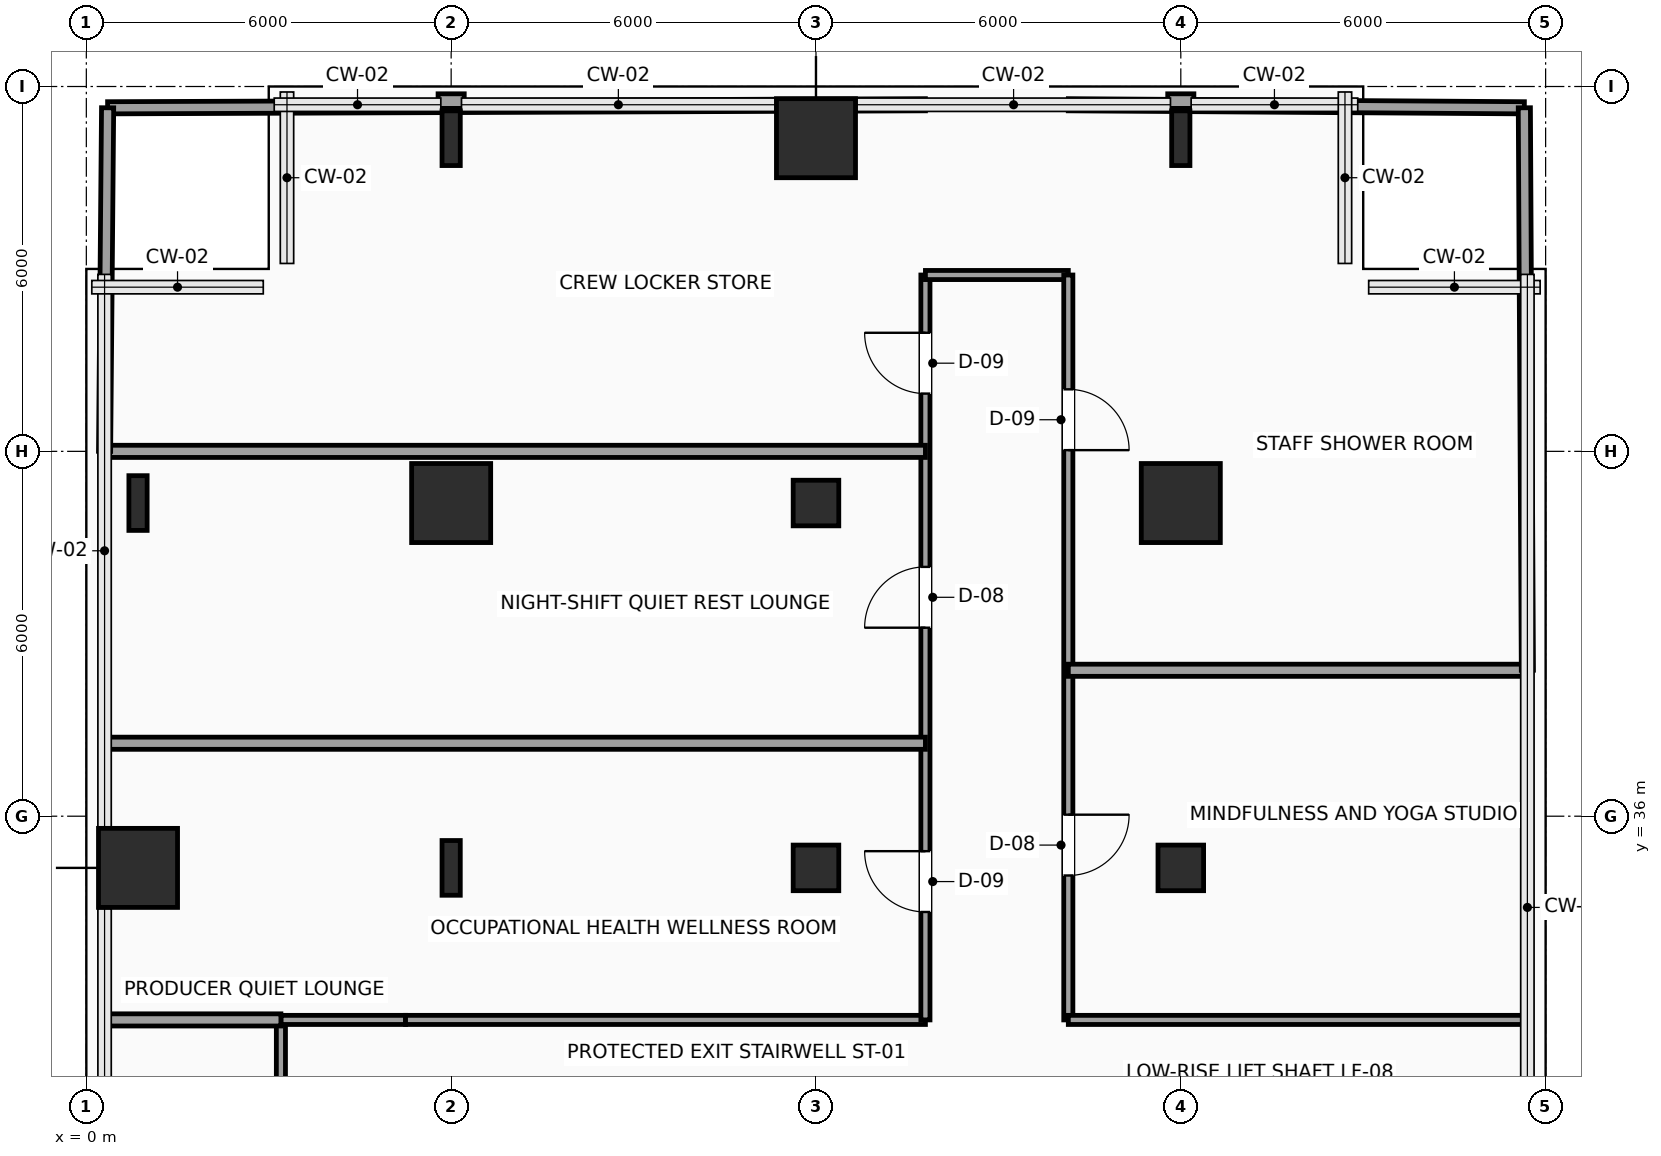
"""IFC4 building model, lengths in metres.
Left out: names, types, materials, properties, quantities, classifications, styles, units other than length and angle.
Written with IfcOpenShell. Run it as: python <this file> out.ifc"""

import sys

from ifc_helpers import new_model, si_unit, direction, frame, frame_2d, origin, origin_2d, place, context, subcontext, project, spatial, rectangle, hollow_rectangle, i_section, extrude, element, fill, save


model = new_model("IFC4")
c1 = context("Model", 3, precision=1e-05, world=origin(), true_north=direction((0.0, 1.0)))
c2 = subcontext(c1, "Body", "Model", "MODEL_VIEW")
j1 = project(units=[si_unit("LENGTHUNIT", "METRE"), si_unit("PLANEANGLEUNIT", "RADIAN")], contexts=[c1])
p1 = place(None, origin())
s1 = spatial("IfcSite", under=j1, at=p1, CompositionType="ELEMENT")
p2 = place(p1, origin())
s2 = spatial("IfcBuilding", under=s1, at=p2, CompositionType="ELEMENT")
p3 = place(p2, frame((0.0, 0.0, 67.5)))
s3 = spatial("IfcBuildingStorey", under=s2, at=p3, CompositionType="ELEMENT", Elevation=67.5)
p4 = place(p3, frame((0.85, 35.15, 0.0), z_axis=(0.0, 0.0, 1.0), x_axis=(1.0, 0.0, 0.0)))
e1 = element("IfcColumn", 1, at=p4, inside=s3, PredefinedType="COLUMN", context=c2, shape_type="SweptSolid", body=[
    extrude(rectangle(XDim=1.3, YDim=1.3, at=origin_2d()), origin(), (0.0, 0.0, 1.0), 3.9),
])
for number, where, z_axis, x_axis in (
    (2, (0.85, 41.15, 0.0), (0.0, 0.0, 1.0), (1.0, 0.0, 0.0)),
    (3, (6.0, 35.15, 0.0), (0.0, 0.0, 1.0), (1.0, 0.0, 0.0)),
):
    element("IfcColumn", number, at=place(p3, frame(where, z_axis=z_axis, x_axis=x_axis)), inside=s3, PredefinedType="COLUMN", context=c2, shape_type="SweptSolid", body=[
        extrude(i_section(OverallWidth=0.3, OverallDepth=0.9, WebThickness=0.019, FlangeThickness=0.035, FilletRadius=0.03, at=origin_2d()), origin(), (0.0, 0.0, 1.0), 3.9),
    ])
p5 = place(p3, frame((6.0, 41.15, 0.0), z_axis=(0.0, 0.0, 1.0), x_axis=(1.0, 0.0, 0.0)))
e4 = element("IfcColumn", 4, at=p5, inside=s3, PredefinedType="COLUMN", context=c2, shape_type="SweptSolid", body=[
    extrude(rectangle(XDim=1.3, YDim=1.3, at=origin_2d()), origin(), (0.0, 0.0, 1.0), 3.9),
])
p6 = place(p3, frame((6.0, 47.15, 0.0), z_axis=(0.0, 0.0, 1.0), x_axis=(1.0, 0.0, 0.0)))
e5 = element("IfcColumn", 5, at=p6, inside=s3, PredefinedType="COLUMN", context=c2, shape_type="SweptSolid", body=[
    extrude(i_section(OverallWidth=0.3, OverallDepth=0.9, WebThickness=0.019, FlangeThickness=0.035, FilletRadius=0.03, at=origin_2d()), origin(), (0.0, 0.0, 1.0), 3.9),
])
for number, where, z_axis, x_axis in (
    (6, (12.0, 35.15, 0.0), (0.0, 0.0, 1.0), (1.0, 0.0, 0.0)),
    (7, (12.0, 41.15, 0.0), (0.0, 0.0, 1.0), (1.0, 0.0, 0.0)),
):
    element("IfcColumn", number, at=place(p3, frame(where, z_axis=z_axis, x_axis=x_axis)), inside=s3, PredefinedType="COLUMN", context=c2, shape_type="SweptSolid", body=[
        extrude(hollow_rectangle(XDim=0.75, YDim=0.75, WallThickness=0.035, InnerFilletRadius=0.035, OuterFilletRadius=0.05, at=origin_2d()), origin(), (0.0, 0.0, 1.0), 3.9),
    ])
p7 = place(p3, frame((12.0, 47.15, 0.0), z_axis=(0.0, 0.0, 1.0), x_axis=(1.0, 0.0, 0.0)))
e8 = element("IfcColumn", 8, at=p7, inside=s3, PredefinedType="COLUMN", context=c2, shape_type="SweptSolid", body=[
    extrude(rectangle(XDim=1.3, YDim=1.3, at=origin_2d()), origin(), (0.0, 0.0, 1.0), 3.9),
])
p8 = place(p3, frame((18.0, 35.15, 0.0), z_axis=(0.0, 0.0, 1.0), x_axis=(1.0, 0.0, 0.0)))
e9 = element("IfcColumn", 9, at=p8, inside=s3, PredefinedType="COLUMN", context=c2, shape_type="SweptSolid", body=[
    extrude(hollow_rectangle(XDim=0.75, YDim=0.75, WallThickness=0.035, InnerFilletRadius=0.035, OuterFilletRadius=0.05, at=origin_2d()), origin(), (0.0, 0.0, 1.0), 3.9),
])
p9 = place(p3, frame((18.0, 41.15, 0.0), z_axis=(0.0, 0.0, 1.0), x_axis=(1.0, 0.0, 0.0)))
e10 = element("IfcColumn", 10, at=p9, inside=s3, PredefinedType="COLUMN", context=c2, shape_type="SweptSolid", body=[
    extrude(rectangle(XDim=1.3, YDim=1.3, at=origin_2d()), origin(), (0.0, 0.0, 1.0), 3.9),
])
p10 = place(p3, frame((18.0, 47.15, 0.0), z_axis=(0.0, 0.0, 1.0), x_axis=(1.0, 0.0, 0.0)))
e11 = element("IfcColumn", 11, at=p10, inside=s3, PredefinedType="COLUMN", context=c2, shape_type="SweptSolid", body=[
    extrude(i_section(OverallWidth=0.3, OverallDepth=0.9, WebThickness=0.019, FlangeThickness=0.035, FilletRadius=0.03, at=origin_2d()), origin(), (0.0, 0.0, 1.0), 3.9),
])
for number, where, z_axis, x_axis in (
    (12, (5.785, 47.76, 0.0), (0.0, 0.0, 1.0), (1.0, 0.0, 0.0)),
    (13, (17.785, 47.76, 0.0), (0.0, 0.0, 1.0), (1.0, 0.0, 0.0)),
):
    element("IfcWall", number, at=place(p3, frame(where, z_axis=z_axis, x_axis=x_axis)), inside=s3, PredefinedType="SOLIDWALL", context=c2, shape_type="SweptSolid", body=[
        extrude(rectangle(XDim=0.43, YDim=0.24, at=frame_2d((0.215, 0.0))), origin(), (0.0, 0.0, 1.0), 3.65),
    ])
p11 = place(p3, frame((3.2, 30.25, 0.0), z_axis=(0.0, 0.0, 1.0), x_axis=(0.0, 1.0, 0.0)))
e14 = element("IfcWall", 14, at=p11, inside=s3, PredefinedType="PARTITIONING", context=c2, shape_type="SweptSolid", body=[
    extrude(rectangle(XDim=2.4, YDim=0.15, at=frame_2d((1.2, 0.0))), origin(), (0.0, 0.0, 1.0), 3.65),
])
p12 = place(p3, frame((3.2, 32.65, 0.0), z_axis=(0.0, 0.0, 1.0), x_axis=(1.0, 0.0, 0.0)))
e15 = element("IfcWall", 15, at=p12, inside=s3, PredefinedType="PARTITIONING", context=c2, shape_type="SweptSolid", body=[
    extrude(rectangle(XDim=2.05, YDim=0.15, at=frame_2d((1.025, 0.0))), origin(), (0.0, 0.0, 1.0), 3.65),
])
p13 = place(p3, frame((5.25, 32.65, 0.0), z_axis=(0.0, 0.0, 1.0), x_axis=(1.0, 0.0, 0.0)))
e16 = element("IfcWall", 16, at=p13, inside=s3, PredefinedType="PARTITIONING", context=c2, shape_type="SweptSolid", body=[
    extrude(rectangle(XDim=8.55, YDim=0.15, at=frame_2d((4.275, 0.0))), origin(), (0.0, 0.0, 1.0), 3.65),
])
p14 = place(p3, frame((13.8, 32.65, 0.0), z_axis=(0.0, 0.0, 1.0), x_axis=(0.0, 1.0, 0.0)))
e17 = element("IfcWall", 17, at=p14, inside=s3, PredefinedType="PARTITIONING", context=c2, shape_type="SweptSolid", body=[
    extrude(rectangle(XDim=12.25, YDim=0.15, at=frame_2d((6.125, 0.0))), origin(), (0.0, 0.0, 1.0), 3.65),
])
p15 = place(p14, frame((1.775, 0.0, 0.0)))
e18 = element("IfcOpeningElement", 18, at=p15, cuts=e17, PredefinedType="OPENING", context=c2, shape_type="SweptSolid", body=[
    extrude(rectangle(XDim=1.0, YDim=2.2, at=frame_2d((0.5, 1.1))), frame((0.0, 0.085, 0.0), z_axis=(0.0, -1.0, 0.0), x_axis=(1.0, 0.0, 0.0)), (0.0, 0.0, 1.0), 0.17),
])
p16 = place(p14, frame((6.45, 0.0, 0.0)))
e19 = element("IfcOpeningElement", 19, at=p16, cuts=e17, PredefinedType="OPENING", context=c2, shape_type="SweptSolid", body=[
    extrude(rectangle(XDim=1.0, YDim=2.2, at=frame_2d((0.5, 1.1))), frame((0.0, 0.085, 0.0), z_axis=(0.0, -1.0, 0.0), x_axis=(1.0, 0.0, 0.0)), (0.0, 0.0, 1.0), 0.17),
])
p17 = place(p14, frame((10.3, 0.0, 0.0)))
e20 = element("IfcOpeningElement", 20, at=p17, cuts=e17, PredefinedType="OPENING", context=c2, shape_type="SweptSolid", body=[
    extrude(rectangle(XDim=1.0, YDim=2.2, at=frame_2d((0.5, 1.1))), frame((0.0, 0.085, 0.0), z_axis=(0.0, -1.0, 0.0), x_axis=(1.0, 0.0, 0.0)), (0.0, 0.0, 1.0), 0.17),
])
p18 = place(p3, frame((13.8, 44.9, 0.0), z_axis=(0.0, 0.0, 1.0), x_axis=(1.0, 0.0, 0.0)))
e21 = element("IfcWall", 21, at=p18, inside=s3, PredefinedType="PARTITIONING", context=c2, shape_type="SweptSolid", body=[
    extrude(rectangle(XDim=2.35, YDim=0.15, at=frame_2d((1.175, 0.0))), origin(), (0.0, 0.0, 1.0), 3.65),
])
p19 = place(p3, frame((16.15, 44.9, 0.0), z_axis=(0.0, 0.0, 1.0), x_axis=(0.0, -1.0, 0.0)))
e22 = element("IfcWall", 22, at=p19, inside=s3, PredefinedType="PARTITIONING", context=c2, shape_type="SweptSolid", body=[
    extrude(rectangle(XDim=12.25, YDim=0.15, at=frame_2d((6.125, 0.0))), origin(), (0.0, 0.0, 1.0), 3.65),
])
p20 = place(p19, frame((8.875, 0.0, 0.0)))
e23 = element("IfcOpeningElement", 23, at=p20, cuts=e22, PredefinedType="OPENING", context=c2, shape_type="SweptSolid", body=[
    extrude(rectangle(XDim=1.0, YDim=2.2, at=frame_2d((0.5, 1.1))), frame((0.0, 0.085, 0.0), z_axis=(0.0, -1.0, 0.0), x_axis=(1.0, 0.0, 0.0)), (0.0, 0.0, 1.0), 0.17),
])
p21 = place(p19, frame((1.88, 0.0, 0.0)))
e24 = element("IfcOpeningElement", 24, at=p21, cuts=e22, PredefinedType="OPENING", context=c2, shape_type="SweptSolid", body=[
    extrude(rectangle(XDim=1.0, YDim=2.2, at=frame_2d((0.5, 1.1))), frame((0.0, 0.085, 0.0), z_axis=(0.0, -1.0, 0.0), x_axis=(1.0, 0.0, 0.0)), (0.0, 0.0, 1.0), 0.17),
])
p22 = place(p3, frame((16.15, 32.65, 0.0), z_axis=(0.0, 0.0, 1.0), x_axis=(1.0, 0.0, 0.0)))
e25 = element("IfcWall", 25, at=p22, inside=s3, PredefinedType="PARTITIONING", context=c2, shape_type="SweptSolid", body=[
    extrude(rectangle(XDim=7.55, YDim=0.15, at=frame_2d((3.775, 0.0))), origin(), (0.0, 0.0, 1.0), 3.65),
])
for number, where, z_axis, x_axis in (
    (26, (0.3, 37.2, 0.0), (0.0, 0.0, 1.0), (1.0, 0.0, 0.0)),
    (27, (0.3, 42.0, 0.0), (0.0, 0.0, 1.0), (1.0, 0.0, 0.0)),
):
    element("IfcWall", number, at=place(p3, frame(where, z_axis=z_axis, x_axis=x_axis)), inside=s3, PredefinedType="PARTITIONING", context=c2, shape_type="SweptSolid", body=[
        extrude(rectangle(XDim=13.5, YDim=0.2, at=frame_2d((6.75, 0.0))), origin(), (0.0, 0.0, 1.0), 3.65),
    ])
p23 = place(p3, frame((0.35, 47.65, 0.0), z_axis=(0.0, 0.0, 1.0), x_axis=(0.99999304924, 0.003728467862, 0.0)))
e28 = element("IfcWall", 28, at=p23, inside=s3, PredefinedType="PARTITIONING", context=c2, shape_type="SweptSolid", body=[
    extrude(rectangle(XDim=5.435, YDim=0.2, at=frame_2d((2.717, 0.0))), origin(), (0.0, 0.0, 1.0), 3.65),
])
p24 = place(p3, frame((6.215, 47.672, 0.0), z_axis=(0.0, 0.0, 1.0), x_axis=(0.999993149305, 0.003701532515, 0.0)))
e29 = element("IfcWall", 29, at=p24, inside=s3, PredefinedType="PARTITIONING", context=c2, shape_type="SweptSolid", body=[
    extrude(rectangle(XDim=7.585, YDim=0.2, at=frame_2d((3.792, 0.0))), origin(), (0.0, 0.0, 1.0), 3.65),
])
p25 = place(p3, frame((0.3, 42.0, 0.0), z_axis=(0.0, 0.0, 1.0), x_axis=(0.00885800524, 0.999960767102, 0.0)))
e30 = element("IfcWall", 30, at=p25, inside=s3, PredefinedType="PARTITIONING", context=c2, shape_type="SweptSolid", body=[
    extrude(rectangle(XDim=5.65, YDim=0.2, at=frame_2d((2.825, 0.0))), origin(), (0.0, 0.0, 1.0), 3.65),
])
p26 = place(p3, frame((16.15, 38.4, 0.0), z_axis=(0.0, 0.0, 1.0), x_axis=(1.0, 0.0, 0.0)))
e31 = element("IfcWall", 31, at=p26, inside=s3, PredefinedType="PARTITIONING", context=c2, shape_type="SweptSolid", body=[
    extrude(rectangle(XDim=7.55, YDim=0.2, at=frame_2d((3.775, 0.0))), origin(), (0.0, 0.0, 1.0), 3.142),
])
p27 = place(p3, frame((16.15, 47.7, 0.0), z_axis=(0.0, 0.0, 1.0), x_axis=(0.999978417552, -0.006569964219, 0.0)))
e32 = element("IfcWall", 32, at=p27, inside=s3, PredefinedType="PARTITIONING", context=c2, shape_type="SweptSolid", body=[
    extrude(rectangle(XDim=1.635, YDim=0.2, at=frame_2d((0.817, 0.0))), origin(), (0.0, 0.0, 1.0), 3.65),
])
p28 = place(p3, frame((18.215, 47.686, 0.0), z_axis=(0.0, 0.0, 1.0), x_axis=(0.999977600485, -0.006693170229, 0.0)))
e33 = element("IfcWall", 33, at=p28, inside=s3, PredefinedType="PARTITIONING", context=c2, shape_type="SweptSolid", body=[
    extrude(rectangle(XDim=5.435, YDim=0.2, at=frame_2d((2.717, 0.0))), origin(), (0.0, 0.0, 1.0), 3.65),
])
p29 = place(p3, frame((23.7, 38.4, 0.0), z_axis=(0.0, 0.0, 1.0), x_axis=(-0.005410604923, 0.99998536257, 0.0)))
e34 = element("IfcWall", 34, at=p29, inside=s3, PredefinedType="PARTITIONING", context=c2, shape_type="SweptSolid", body=[
    extrude(rectangle(XDim=9.25, YDim=0.2, at=frame_2d((4.625, 0.0))), origin(), (0.0, 0.0, 1.0), 3.65),
])
p30 = place(p3, frame((0.3, 32.65, 0.0), z_axis=(0.0, 0.0, 1.0), x_axis=(1.0, 0.0, 0.0)))
e35 = element("IfcWall", 35, at=p30, inside=s3, PredefinedType="PARTITIONING", context=c2, shape_type="SweptSolid", body=[
    extrude(rectangle(XDim=2.9, YDim=0.2, at=frame_2d((1.45, 0.0))), origin(), (0.0, 0.0, 1.0), 3.65),
])
p31 = place(p15, origin())
e36 = element("IfcDoor", 36, at=p31, inside=s3, OperationType="SINGLE_SWING_RIGHT", PredefinedType="DOOR", context=c2, shape_type="SweptSolid", body=[
    extrude(rectangle(XDim=1.0, YDim=2.2, at=frame_2d((0.5, 1.1))), frame((0.0, 0.025, 0.0), z_axis=(0.0, -1.0, 0.0), x_axis=(1.0, 0.0, 0.0)), (0.0, 0.0, 1.0), 0.05),
])
fill(e18, e36)
p32 = place(p16, origin())
e37 = element("IfcDoor", 37, at=p32, inside=s3, OperationType="SINGLE_SWING_LEFT", PredefinedType="DOOR", context=c2, shape_type="SweptSolid", body=[
    extrude(rectangle(XDim=1.0, YDim=2.2, at=frame_2d((0.5, 1.1))), frame((0.0, 0.025, 0.0), z_axis=(0.0, -1.0, 0.0), x_axis=(1.0, 0.0, 0.0)), (0.0, 0.0, 1.0), 0.05),
])
fill(e19, e37)
p33 = place(p17, origin())
e38 = element("IfcDoor", 38, at=p33, inside=s3, OperationType="SINGLE_SWING_RIGHT", PredefinedType="DOOR", context=c2, shape_type="SweptSolid", body=[
    extrude(rectangle(XDim=1.0, YDim=2.2, at=frame_2d((0.5, 1.1))), frame((0.0, 0.025, 0.0), z_axis=(0.0, -1.0, 0.0), x_axis=(1.0, 0.0, 0.0)), (0.0, 0.0, 1.0), 0.05),
])
fill(e20, e38)
p34 = place(p20, origin())
e39 = element("IfcDoor", 39, at=p34, inside=s3, OperationType="SINGLE_SWING_LEFT", PredefinedType="DOOR", context=c2, shape_type="SweptSolid", body=[
    extrude(rectangle(XDim=1.0, YDim=2.2, at=frame_2d((0.5, 1.1))), frame((0.0, 0.025, 0.0), z_axis=(0.0, -1.0, 0.0), x_axis=(1.0, 0.0, 0.0)), (0.0, 0.0, 1.0), 0.05),
])
fill(e23, e39)
p35 = place(p21, origin())
e40 = element("IfcDoor", 40, at=p35, inside=s3, OperationType="SINGLE_SWING_RIGHT", PredefinedType="DOOR", context=c2, shape_type="SweptSolid", body=[
    extrude(rectangle(XDim=1.0, YDim=2.2, at=frame_2d((0.5, 1.1))), frame((0.0, 0.025, 0.0), z_axis=(0.0, -1.0, 0.0), x_axis=(1.0, 0.0, 0.0)), (0.0, 0.0, 1.0), 0.05),
])
fill(e24, e40)
save(model, sys.argv[1])
